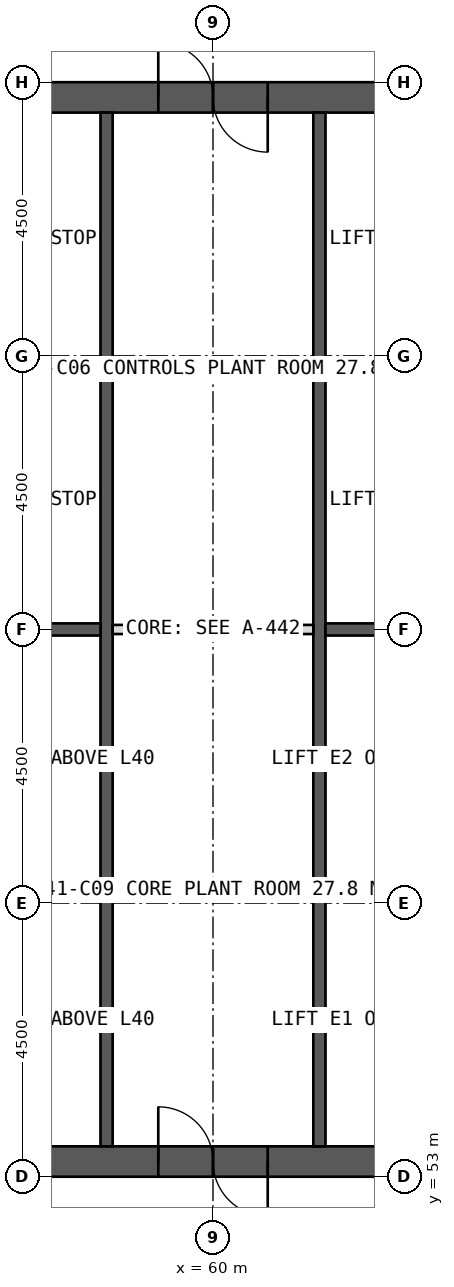
"""IFC4 building model, lengths in metres.
Left out: names, types, materials, properties, quantities, classifications, styles, units other than length and angle.
Written with IfcOpenShell. Run it as: python <this file> out.ifc"""

import sys

from ifc_helpers import new_model, si_unit, direction, frame, frame_2d, origin, place, context, subcontext, project, spatial, rectangle, extrude, element, fill, save


model = new_model("IFC4")
c1 = context("Model", 3, precision=1e-05, world=origin(), true_north=direction((0.0, 1.0)))
c2 = subcontext(c1, "Body", "Model", "MODEL_VIEW")
j1 = project(units=[si_unit("LENGTHUNIT", "METRE"), si_unit("PLANEANGLEUNIT", "RADIAN")], contexts=[c1])
p1 = place(None, origin())
s1 = spatial("IfcSite", under=j1, at=p1, CompositionType="ELEMENT")
p2 = place(p1, origin())
s2 = spatial("IfcBuilding", under=s1, at=p2, CompositionType="ELEMENT")
p3 = place(p2, frame((0.0, 0.0, 172.0)))
s3 = spatial("IfcBuildingStorey", under=s2, at=p3, CompositionType="ELEMENT", Elevation=172.0)
p4 = place(p3, frame((51.0, 70.75, 0.0), z_axis=(0.0, 0.0, 1.0), x_axis=(1.0, 0.0, 0.0)))
e1 = element("IfcWall", 1, at=p4, inside=s3, PredefinedType="SHEAR", context=c2, shape_type="SweptSolid", body=[
    extrude(rectangle(XDim=18.0, YDim=0.5, at=frame_2d((9.0, 0.0))), origin(), (0.0, 0.0, 1.0), 5.0),
])
p5 = place(p4, frame((8.1, 0.0, 0.0)))
e2 = element("IfcOpeningElement", 2, at=p5, cuts=e1, PredefinedType="OPENING", context=c2, shape_type="SweptSolid", body=[
    extrude(rectangle(XDim=1.8, YDim=2.2, at=frame_2d((0.9, 1.1))), frame((0.0, 0.26, 0.0), z_axis=(0.0, -1.0, 0.0), x_axis=(1.0, 0.0, 0.0)), (0.0, 0.0, 1.0), 0.52),
])
p6 = place(p3, frame((51.0, 53.25, 0.0), z_axis=(0.0, 0.0, 1.0), x_axis=(1.0, 0.0, 0.0)))
e3 = element("IfcWall", 3, at=p6, inside=s3, PredefinedType="SHEAR", context=c2, shape_type="SweptSolid", body=[
    extrude(rectangle(XDim=18.0, YDim=0.5, at=frame_2d((9.0, 0.0))), origin(), (0.0, 0.0, 1.0), 5.0),
])
p7 = place(p6, frame((8.1, 0.0, 0.0)))
e4 = element("IfcOpeningElement", 4, at=p7, cuts=e3, PredefinedType="OPENING", context=c2, shape_type="SweptSolid", body=[
    extrude(rectangle(XDim=1.8, YDim=2.2, at=frame_2d((0.9, 1.1))), frame((0.0, 0.26, 0.0), z_axis=(0.0, -1.0, 0.0), x_axis=(1.0, 0.0, 0.0)), (0.0, 0.0, 1.0), 0.52),
])
for number, where, z_axis, x_axis in (
    (5, (58.25, 53.5, 0.0), (0.0, 0.0, 1.0), (0.0, 1.0, 0.0)),
    (6, (61.75, 53.5, 0.0), (0.0, 0.0, 1.0), (0.0, 1.0, 0.0)),
):
    element("IfcWall", number, at=place(p3, frame(where, z_axis=z_axis, x_axis=x_axis)), inside=s3, PredefinedType="SHEAR", context=c2, shape_type="SweptSolid", body=[
        extrude(rectangle(XDim=17.0, YDim=0.2, at=frame_2d((8.5, 0.0))), origin(), (0.0, 0.0, 1.0), 5.0),
    ])
for number, where, z_axis, x_axis in (
    (7, (55.1, 57.75, 0.0), (0.0, 0.0, 1.0), (1.0, 0.0, 0.0)),
    (8, (61.85, 57.75, 0.0), (0.0, 0.0, 1.0), (1.0, 0.0, 0.0)),
    (9, (55.1, 62.0, 0.0), (0.0, 0.0, 1.0), (1.0, 0.0, 0.0)),
    (10, (61.85, 62.0, 0.0), (0.0, 0.0, 1.0), (1.0, 0.0, 0.0)),
    (11, (55.1, 66.25, 0.0), (0.0, 0.0, 1.0), (1.0, 0.0, 0.0)),
    (12, (61.85, 66.25, 0.0), (0.0, 0.0, 1.0), (1.0, 0.0, 0.0)),
):
    element("IfcWall", number, at=place(p3, frame(where, z_axis=z_axis, x_axis=x_axis)), inside=s3, PredefinedType="SHEAR", context=c2, shape_type="SweptSolid", body=[
        extrude(rectangle(XDim=3.05, YDim=0.2, at=frame_2d((1.525, 0.0))), origin(), (0.0, 0.0, 1.0), 5.0),
    ])
p8 = place(p3, frame((58.35, 62.0, 0.0), z_axis=(0.0, 0.0, 1.0), x_axis=(1.0, 0.0, 0.0)))
e13 = element("IfcWall", 13, at=p8, inside=s3, PredefinedType="PARTITIONING", context=c2, shape_type="SweptSolid", body=[
    extrude(rectangle(XDim=3.3, YDim=0.15, at=frame_2d((1.65, 0.0))), origin(), (0.0, 0.0, 1.0), 4.75),
])
p9 = place(p5, origin())
e14 = element("IfcDoor", 14, at=p9, inside=s3, OperationType="DOUBLE_DOOR_SINGLE_SWING", PredefinedType="DOOR", context=c2, shape_type="SweptSolid", body=[
    extrude(rectangle(XDim=1.8, YDim=2.2, at=frame_2d((0.9, 1.1))), frame((0.0, 0.025, 0.0), z_axis=(0.0, -1.0, 0.0), x_axis=(1.0, 0.0, 0.0)), (0.0, 0.0, 1.0), 0.05),
])
fill(e2, e14)
p10 = place(p7, origin())
e15 = element("IfcDoor", 15, at=p10, inside=s3, OperationType="DOUBLE_DOOR_SINGLE_SWING", PredefinedType="DOOR", context=c2, shape_type="SweptSolid", body=[
    extrude(rectangle(XDim=1.8, YDim=2.2, at=frame_2d((0.9, 1.1))), frame((0.0, 0.025, 0.0), z_axis=(0.0, -1.0, 0.0), x_axis=(1.0, 0.0, 0.0)), (0.0, 0.0, 1.0), 0.05),
])
fill(e4, e15)
save(model, sys.argv[1])
